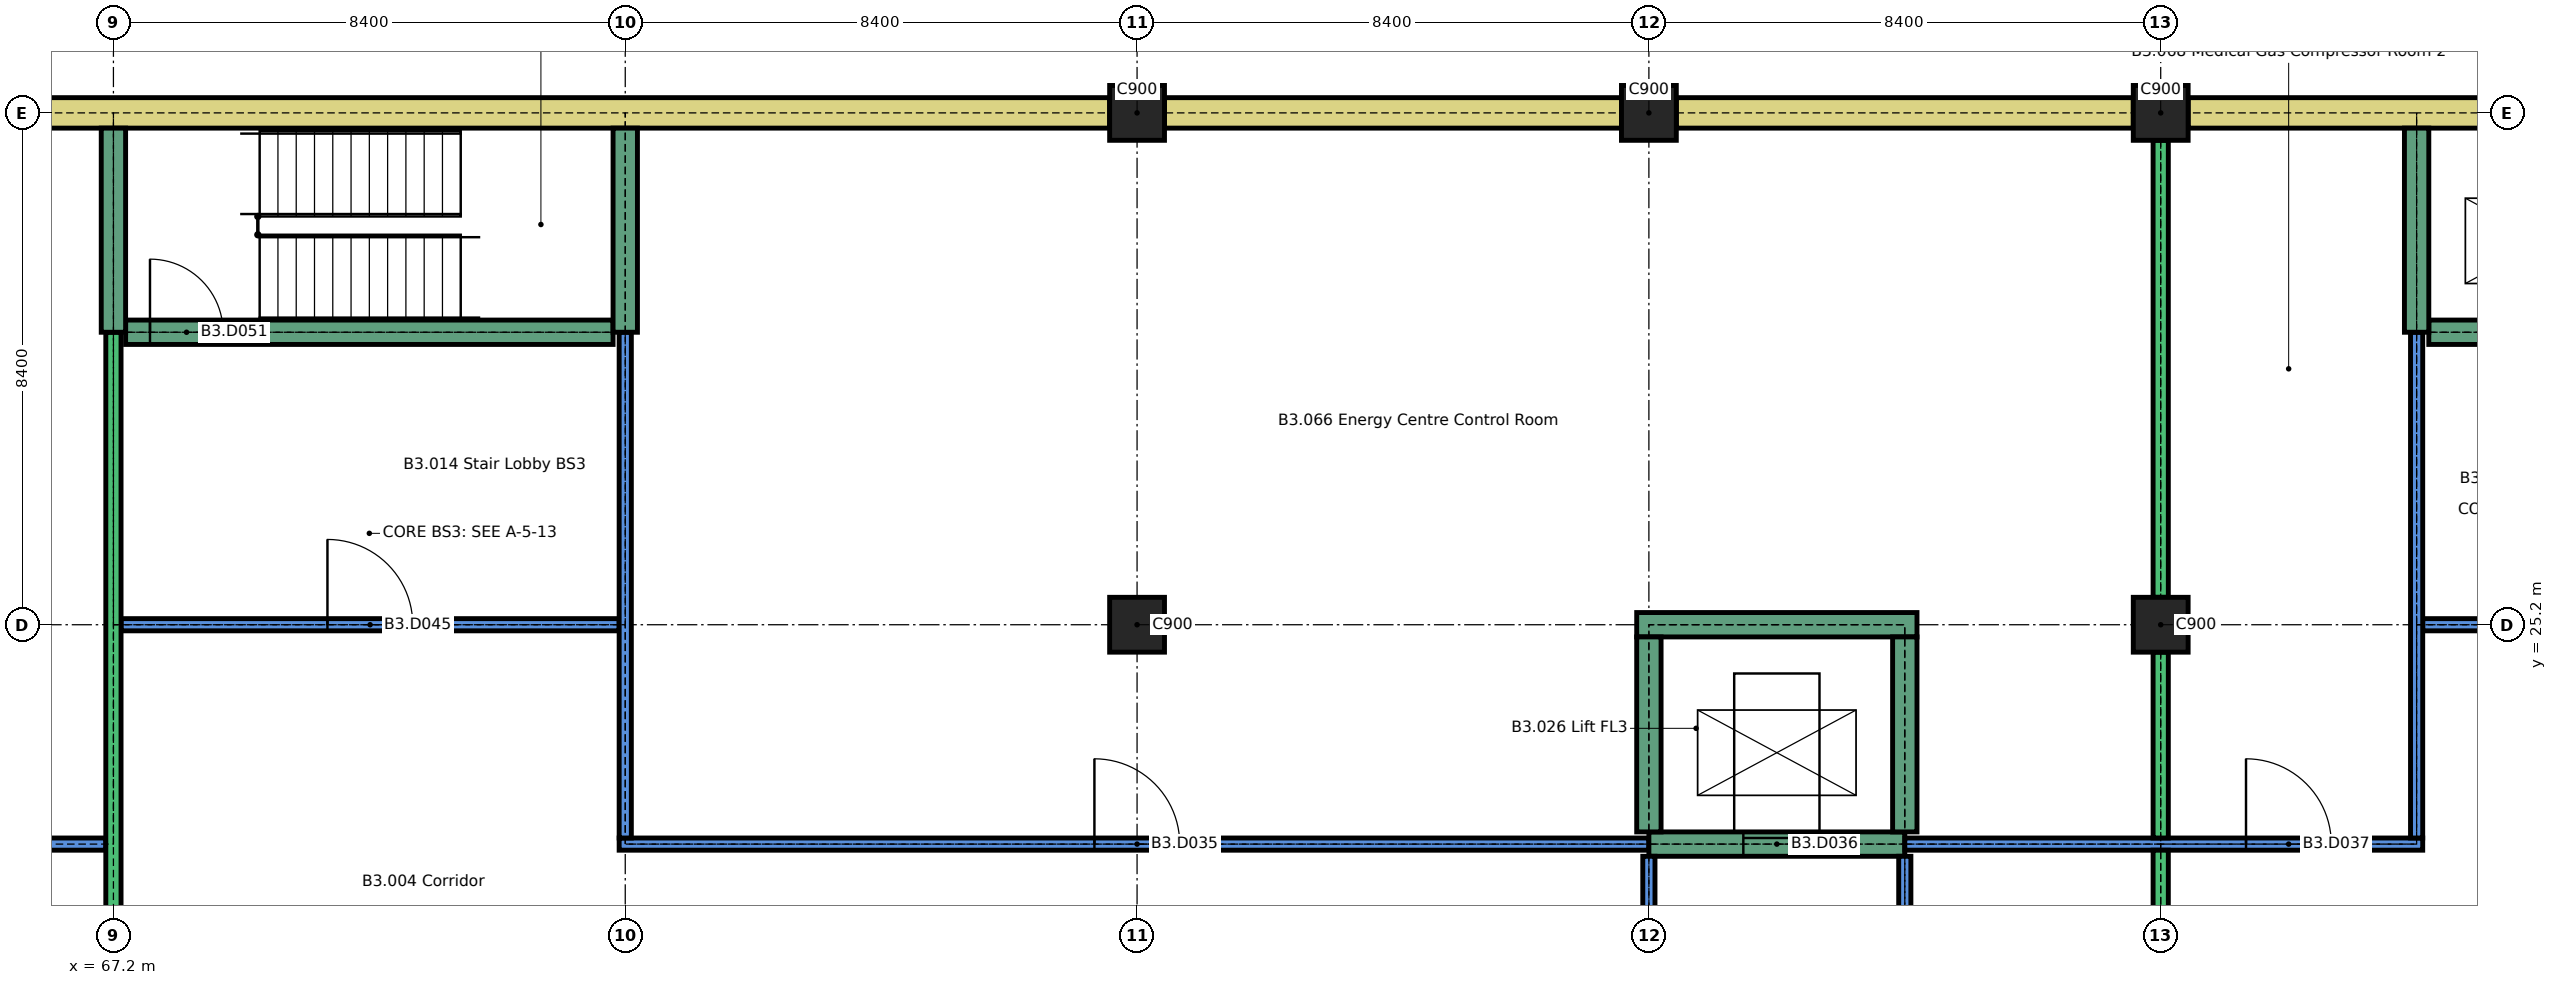
"""IFC4 building model, lengths in metres.
Left out: names, types, materials, properties, quantities, classifications, styles, units other than length and angle.
Written with IfcOpenShell. Run it as: python <this file> out.ifc"""

import sys

from ifc_helpers import new_model, si_unit, direction, frame, frame_2d, origin, origin_2d, place, context, subcontext, project, spatial, rectangle, extrude, element, fill, save


model = new_model("IFC4")
c1 = context("Model", 3, precision=1e-05, world=origin(), true_north=direction((0.0, 1.0)))
c2 = subcontext(c1, "Body", "Model", "MODEL_VIEW")
j1 = project(units=[si_unit("LENGTHUNIT", "METRE"), si_unit("PLANEANGLEUNIT", "RADIAN")], contexts=[c1])
p1 = place(None, origin())
s1 = spatial("IfcSite", under=j1, at=p1, CompositionType="ELEMENT")
p2 = place(p1, origin())
s2 = spatial("IfcBuilding", under=s1, at=p2, CompositionType="ELEMENT")
p3 = place(p2, frame((0.0, 0.0, -11.4)))
s3 = spatial("IfcBuildingStorey", under=s2, at=p3, CompositionType="ELEMENT", Elevation=-11.4)
for number, where, z_axis, x_axis in (
    (1, (84.0, 25.2, 0.0), (0.0, 0.0, 1.0), (1.0, 0.0, 0.0)),
    (2, (100.8, 25.2, 0.0), (0.0, 0.0, 1.0), (1.0, 0.0, 0.0)),
    (3, (84.0, 33.6, 0.0), (0.0, 0.0, 1.0), (1.0, 0.0, 0.0)),
    (4, (92.4, 33.6, 0.0), (0.0, 0.0, 1.0), (1.0, 0.0, 0.0)),
    (5, (100.8, 33.6, 0.0), (0.0, 0.0, 1.0), (1.0, 0.0, 0.0)),
):
    element("IfcColumn", number, at=place(p3, frame(where, z_axis=z_axis, x_axis=x_axis)), inside=s3, PredefinedType="COLUMN", context=c2, shape_type="SweptSolid", body=[
        extrude(rectangle(XDim=0.9, YDim=0.9, at=origin_2d()), origin(), (0.0, 0.0, 1.0), 3.2),
    ])
p4 = place(p3, frame((42.45, 33.6, 0.0), z_axis=(0.0, 0.0, 1.0), x_axis=(1.0, 0.0, 0.0)))
e6 = element("IfcWall", 6, at=p4, inside=s3, PredefinedType="SOLIDWALL", context=c2, shape_type="SweptSolid", body=[
    extrude(rectangle(XDim=41.1, YDim=0.5, at=frame_2d((20.55, 0.0))), origin(), (0.0, 0.0, 1.0), 3.2),
])
for number, where, z_axis, x_axis in (
    (7, (84.45, 33.6, 0.0), (0.0, 0.0, 1.0), (1.0, 0.0, 0.0)),
    (8, (92.85, 33.6, 0.0), (0.0, 0.0, 1.0), (1.0, 0.0, 0.0)),
):
    element("IfcWall", number, at=place(p3, frame(where, z_axis=z_axis, x_axis=x_axis)), inside=s3, PredefinedType="SOLIDWALL", context=c2, shape_type="SweptSolid", body=[
        extrude(rectangle(XDim=7.5, YDim=0.5, at=frame_2d((3.75, 0.0))), origin(), (0.0, 0.0, 1.0), 3.2),
    ])
p5 = place(p3, frame((101.25, 33.6, 0.0), z_axis=(0.0, 0.0, 1.0), x_axis=(1.0, 0.0, 0.0)))
e9 = element("IfcWall", 9, at=p5, inside=s3, PredefinedType="SOLIDWALL", context=c2, shape_type="SweptSolid", body=[
    extrude(rectangle(XDim=32.7, YDim=0.5, at=frame_2d((16.35, 0.0))), origin(), (0.0, 0.0, 1.0), 3.2),
])
p6 = place(p3, frame((58.7, 21.6, 0.0), z_axis=(0.0, 0.0, 1.0), x_axis=(1.0, 0.0, 0.0)))
e10 = element("IfcWall", 10, at=p6, inside=s3, PredefinedType="PARTITIONING", context=c2, shape_type="SweptSolid", body=[
    extrude(rectangle(XDim=8.375, YDim=0.2, at=frame_2d((4.188, 0.0))), origin(), (0.0, 0.0, 1.0), 3.2),
])
p7 = place(p6, frame((3.538, 0.0, 0.0)))
e11 = element("IfcOpeningElement", 11, at=p7, cuts=e10, PredefinedType="OPENING", context=c2, shape_type="SweptSolid", body=[
    extrude(rectangle(XDim=1.4, YDim=2.1, at=frame_2d((0.7, 1.05))), frame((0.0, 0.11, 0.0), z_axis=(0.0, -1.0, 0.0), x_axis=(1.0, 0.0, 0.0)), (0.0, 0.0, 1.0), 0.22),
])
p8 = place(p3, frame((75.5, 21.6, 0.0), z_axis=(0.0, 0.0, 1.0), x_axis=(1.0, 0.0, 0.0)))
e12 = element("IfcWall", 12, at=p8, inside=s3, PredefinedType="PARTITIONING", context=c2, shape_type="SweptSolid", body=[
    extrude(rectangle(XDim=16.9, YDim=0.2, at=frame_2d((8.45, 0.0))), origin(), (0.0, 0.0, 1.0), 3.2),
])
p9 = place(p8, frame((7.8, 0.0, 0.0)))
e13 = element("IfcOpeningElement", 13, at=p9, cuts=e12, PredefinedType="OPENING", context=c2, shape_type="SweptSolid", body=[
    extrude(rectangle(XDim=1.4, YDim=2.1, at=frame_2d((0.7, 1.05))), frame((0.0, 0.11, 0.0), z_axis=(0.0, -1.0, 0.0), x_axis=(1.0, 0.0, 0.0)), (0.0, 0.0, 1.0), 0.22),
])
p10 = place(p3, frame((92.4, 21.6, 0.0), z_axis=(0.0, 0.0, 1.0), x_axis=(1.0, 0.0, 0.0)))
e14 = element("IfcWall", 14, at=p10, inside=s3, PredefinedType="SHEAR", context=c2, shape_type="SweptSolid", body=[
    extrude(rectangle(XDim=4.2, YDim=0.4, at=frame_2d((2.1, 0.0))), origin(), (0.0, 0.0, 1.0), 3.2),
])
p11 = place(p10, frame((1.55, 0.0, 0.0)))
e15 = element("IfcOpeningElement", 15, at=p11, cuts=e14, PredefinedType="OPENING", context=c2, shape_type="SweptSolid", body=[
    extrude(rectangle(XDim=1.1, YDim=2.1, at=frame_2d((0.55, 1.05))), frame((0.0, 0.21, 0.0), z_axis=(0.0, -1.0, 0.0), x_axis=(1.0, 0.0, 0.0)), (0.0, 0.0, 1.0), 0.42),
])
p12 = place(p3, frame((96.6, 21.6, 0.0), z_axis=(0.0, 0.0, 1.0), x_axis=(1.0, 0.0, 0.0)))
e16 = element("IfcWall", 16, at=p12, inside=s3, PredefinedType="PARTITIONING", context=c2, shape_type="SweptSolid", body=[
    extrude(rectangle(XDim=8.5, YDim=0.2, at=frame_2d((4.25, 0.0))), origin(), (0.0, 0.0, 1.0), 3.2),
])
p13 = place(p12, frame((5.6, 0.0, 0.0)))
e17 = element("IfcOpeningElement", 17, at=p13, cuts=e16, PredefinedType="OPENING", context=c2, shape_type="SweptSolid", body=[
    extrude(rectangle(XDim=1.4, YDim=2.1, at=frame_2d((0.7, 1.05))), frame((0.0, 0.11, 0.0), z_axis=(0.0, -1.0, 0.0), x_axis=(1.0, 0.0, 0.0)), (0.0, 0.0, 1.0), 0.22),
])
p14 = place(p3, frame((67.325, 25.2, 0.0), z_axis=(0.0, 0.0, 1.0), x_axis=(1.0, 0.0, 0.0)))
e18 = element("IfcWall", 18, at=p14, inside=s3, PredefinedType="PARTITIONING", context=c2, shape_type="SweptSolid", body=[
    extrude(rectangle(XDim=8.175, YDim=0.2, at=frame_2d((4.087, 0.0))), origin(), (0.0, 0.0, 1.0), 3.2),
])
p15 = place(p14, frame((3.387, 0.0, 0.0)))
e19 = element("IfcOpeningElement", 19, at=p15, cuts=e18, PredefinedType="OPENING", context=c2, shape_type="SweptSolid", body=[
    extrude(rectangle(XDim=1.4, YDim=2.1, at=frame_2d((0.7, 1.05))), frame((0.0, 0.11, 0.0), z_axis=(0.0, -1.0, 0.0), x_axis=(1.0, 0.0, 0.0)), (0.0, 0.0, 1.0), 0.22),
])
p16 = place(p3, frame((92.2, 25.2, 0.0), z_axis=(0.0, 0.0, 1.0), x_axis=(1.0, 0.0, 0.0)))
e20 = element("IfcWall", 20, at=p16, inside=s3, PredefinedType="SHEAR", context=c2, shape_type="SweptSolid", body=[
    extrude(rectangle(XDim=4.6, YDim=0.4, at=frame_2d((2.3, 0.0))), origin(), (0.0, 0.0, 1.0), 3.2),
])
p17 = place(p3, frame((105.1, 25.2, 0.0), z_axis=(0.0, 0.0, 1.0), x_axis=(1.0, 0.0, 0.0)))
e21 = element("IfcWall", 21, at=p17, inside=s3, PredefinedType="PARTITIONING", context=c2, shape_type="SweptSolid", body=[
    extrude(rectangle(XDim=4.0, YDim=0.2, at=frame_2d((2.0, 0.0))), origin(), (0.0, 0.0, 1.0), 3.2),
])
p18 = place(p17, frame((1.0, 0.0, 0.0)))
e22 = element("IfcOpeningElement", 22, at=p18, cuts=e21, PredefinedType="OPENING", context=c2, shape_type="SweptSolid", body=[
    extrude(rectangle(XDim=2.0, YDim=2.4, at=frame_2d((1.0, 1.2))), frame((0.0, 0.11, 0.0), z_axis=(0.0, -1.0, 0.0), x_axis=(1.0, 0.0, 0.0)), (0.0, 0.0, 1.0), 0.22),
])
p19 = place(p3, frame((67.4, 30.0, 0.0), z_axis=(0.0, 0.0, 1.0), x_axis=(1.0, 0.0, 0.0)))
e23 = element("IfcWall", 23, at=p19, inside=s3, PredefinedType="SHEAR", context=c2, shape_type="SweptSolid", body=[
    extrude(rectangle(XDim=8.0, YDim=0.4, at=frame_2d((4.0, 0.0))), origin(), (0.0, 0.0, 1.0), 3.2),
])
p20 = place(p19, frame((0.4, 0.0, 0.0)))
e24 = element("IfcOpeningElement", 24, at=p20, cuts=e23, PredefinedType="OPENING", context=c2, shape_type="SweptSolid", body=[
    extrude(rectangle(XDim=1.2, YDim=2.1, at=frame_2d((0.6, 1.05))), frame((0.0, 0.21, 0.0), z_axis=(0.0, -1.0, 0.0), x_axis=(1.0, 0.0, 0.0)), (0.0, 0.0, 1.0), 0.42),
])
p21 = place(p3, frame((105.2, 30.0, 0.0), z_axis=(0.0, 0.0, 1.0), x_axis=(1.0, 0.0, 0.0)))
e25 = element("IfcWall", 25, at=p21, inside=s3, PredefinedType="SHEAR", context=c2, shape_type="SweptSolid", body=[
    extrude(rectangle(XDim=3.8, YDim=0.4, at=frame_2d((1.9, 0.0))), origin(), (0.0, 0.0, 1.0), 3.2),
])
p22 = place(p21, frame((1.35, 0.0, 0.0)))
e26 = element("IfcOpeningElement", 26, at=p22, cuts=e25, PredefinedType="OPENING", context=c2, shape_type="SweptSolid", body=[
    extrude(rectangle(XDim=1.1, YDim=2.1, at=frame_2d((0.55, 1.05))), frame((0.0, 0.21, 0.0), z_axis=(0.0, -1.0, 0.0), x_axis=(1.0, 0.0, 0.0)), (0.0, 0.0, 1.0), 0.42),
])
p23 = place(p3, frame((67.2, 17.25, 0.0), z_axis=(0.0, 0.0, 1.0), x_axis=(0.0, 1.0, 0.0)))
e27 = element("IfcWall", 27, at=p23, inside=s3, PredefinedType="SOLIDWALL", context=c2, shape_type="SweptSolid", body=[
    extrude(rectangle(XDim=12.75, YDim=0.25, at=frame_2d((6.375, 0.0))), origin(), (0.0, 0.0, 1.0), 3.2),
])
p24 = place(p23, frame((1.475, 0.0, 0.0)))
e28 = element("IfcOpeningElement", 28, at=p24, cuts=e27, PredefinedType="OPENING", context=c2, shape_type="SweptSolid", body=[
    extrude(rectangle(XDim=1.4, YDim=2.1, at=frame_2d((0.7, 1.05))), frame((0.0, 0.135, 0.0), z_axis=(0.0, -1.0, 0.0), x_axis=(1.0, 0.0, 0.0)), (0.0, 0.0, 1.0), 0.27),
])
p25 = place(p3, frame((67.2, 30.0, 0.0), z_axis=(0.0, 0.0, 1.0), x_axis=(0.0, 1.0, 0.0)))
e29 = element("IfcWall", 29, at=p25, inside=s3, PredefinedType="SHEAR", context=c2, shape_type="SweptSolid", body=[
    extrude(rectangle(XDim=3.35, YDim=0.4, at=frame_2d((1.675, 0.0))), origin(), (0.0, 0.0, 1.0), 3.2),
])
p26 = place(p3, frame((75.6, 21.7, 0.0), z_axis=(0.0, 0.0, 1.0), x_axis=(0.0, 1.0, 0.0)))
e30 = element("IfcWall", 30, at=p26, inside=s3, PredefinedType="PARTITIONING", context=c2, shape_type="SweptSolid", body=[
    extrude(rectangle(XDim=8.3, YDim=0.2, at=frame_2d((4.15, 0.0))), origin(), (0.0, 0.0, 1.0), 3.2),
])
p27 = place(p3, frame((75.6, 30.0, 0.0), z_axis=(0.0, 0.0, 1.0), x_axis=(0.0, 1.0, 0.0)))
e31 = element("IfcWall", 31, at=p27, inside=s3, PredefinedType="SHEAR", context=c2, shape_type="SweptSolid", body=[
    extrude(rectangle(XDim=3.35, YDim=0.4, at=frame_2d((1.675, 0.0))), origin(), (0.0, 0.0, 1.0), 3.2),
])
p28 = place(p3, frame((92.4, 16.9, 0.0), z_axis=(0.0, 0.0, 1.0), x_axis=(0.0, 1.0, 0.0)))
e32 = element("IfcWall", 32, at=p28, inside=s3, PredefinedType="PARTITIONING", context=c2, shape_type="SweptSolid", body=[
    extrude(rectangle(XDim=4.5, YDim=0.2, at=frame_2d((2.25, 0.0))), origin(), (0.0, 0.0, 1.0), 3.2),
])
p29 = place(p28, frame((1.25, 0.0, 0.0)))
e33 = element("IfcOpeningElement", 33, at=p29, cuts=e32, PredefinedType="OPENING", context=c2, shape_type="SweptSolid", body=[
    extrude(rectangle(XDim=2.0, YDim=2.4, at=frame_2d((1.0, 1.2))), frame((0.0, 0.11, 0.0), z_axis=(0.0, -1.0, 0.0), x_axis=(1.0, 0.0, 0.0)), (0.0, 0.0, 1.0), 0.22),
])
p30 = place(p3, frame((92.4, 21.8, 0.0), z_axis=(0.0, 0.0, 1.0), x_axis=(0.0, 1.0, 0.0)))
e34 = element("IfcWall", 34, at=p30, inside=s3, PredefinedType="SHEAR", context=c2, shape_type="SweptSolid", body=[
    extrude(rectangle(XDim=3.2, YDim=0.4, at=frame_2d((1.6, 0.0))), origin(), (0.0, 0.0, 1.0), 3.2),
])
p31 = place(p3, frame((96.6, 16.9, 0.0), z_axis=(0.0, 0.0, 1.0), x_axis=(0.0, 1.0, 0.0)))
e35 = element("IfcWall", 35, at=p31, inside=s3, PredefinedType="PARTITIONING", context=c2, shape_type="SweptSolid", body=[
    extrude(rectangle(XDim=4.5, YDim=0.2, at=frame_2d((2.25, 0.0))), origin(), (0.0, 0.0, 1.0), 3.2),
])
p32 = place(p31, frame((1.25, 0.0, 0.0)))
e36 = element("IfcOpeningElement", 36, at=p32, cuts=e35, PredefinedType="OPENING", context=c2, shape_type="SweptSolid", body=[
    extrude(rectangle(XDim=2.0, YDim=2.4, at=frame_2d((1.0, 1.2))), frame((0.0, 0.11, 0.0), z_axis=(0.0, -1.0, 0.0), x_axis=(1.0, 0.0, 0.0)), (0.0, 0.0, 1.0), 0.22),
])
p33 = place(p3, frame((96.6, 21.8, 0.0), z_axis=(0.0, 0.0, 1.0), x_axis=(0.0, 1.0, 0.0)))
e37 = element("IfcWall", 37, at=p33, inside=s3, PredefinedType="SHEAR", context=c2, shape_type="SweptSolid", body=[
    extrude(rectangle(XDim=3.2, YDim=0.4, at=frame_2d((1.6, 0.0))), origin(), (0.0, 0.0, 1.0), 3.2),
])
p34 = place(p3, frame((100.8, 17.25, 0.0), z_axis=(0.0, 0.0, 1.0), x_axis=(0.0, 1.0, 0.0)))
e38 = element("IfcWall", 38, at=p34, inside=s3, PredefinedType="SOLIDWALL", context=c2, shape_type="SweptSolid", body=[
    extrude(rectangle(XDim=4.25, YDim=0.25, at=frame_2d((2.125, 0.0))), origin(), (0.0, 0.0, 1.0), 3.2),
])
p35 = place(p34, frame((1.425, 0.0, 0.0)))
e39 = element("IfcOpeningElement", 39, at=p35, cuts=e38, PredefinedType="OPENING", context=c2, shape_type="SweptSolid", body=[
    extrude(rectangle(XDim=1.4, YDim=2.1, at=frame_2d((0.7, 1.05))), frame((0.0, 0.135, 0.0), z_axis=(0.0, -1.0, 0.0), x_axis=(1.0, 0.0, 0.0)), (0.0, 0.0, 1.0), 0.27),
])
p36 = place(p3, frame((100.8, 21.7, 0.0), z_axis=(0.0, 0.0, 1.0), x_axis=(0.0, 1.0, 0.0)))
e40 = element("IfcWall", 40, at=p36, inside=s3, PredefinedType="SOLIDWALL", context=c2, shape_type="SweptSolid", body=[
    extrude(rectangle(XDim=3.05, YDim=0.25, at=frame_2d((1.525, 0.0))), origin(), (0.0, 0.0, 1.0), 3.2),
])
p37 = place(p3, frame((100.8, 25.65, 0.0), z_axis=(0.0, 0.0, 1.0), x_axis=(0.0, 1.0, 0.0)))
e41 = element("IfcWall", 41, at=p37, inside=s3, PredefinedType="SOLIDWALL", context=c2, shape_type="SweptSolid", body=[
    extrude(rectangle(XDim=7.5, YDim=0.25, at=frame_2d((3.75, 0.0))), origin(), (0.0, 0.0, 1.0), 3.2),
])
p38 = place(p3, frame((105.0, 21.7, 0.0), z_axis=(0.0, 0.0, 1.0), x_axis=(0.0, 1.0, 0.0)))
e42 = element("IfcWall", 42, at=p38, inside=s3, PredefinedType="PARTITIONING", context=c2, shape_type="SweptSolid", body=[
    extrude(rectangle(XDim=8.3, YDim=0.2, at=frame_2d((4.15, 0.0))), origin(), (0.0, 0.0, 1.0), 3.2),
])
p39 = place(p3, frame((105.0, 30.0, 0.0), z_axis=(0.0, 0.0, 1.0), x_axis=(0.0, 1.0, 0.0)))
e43 = element("IfcWall", 43, at=p39, inside=s3, PredefinedType="SHEAR", context=c2, shape_type="SweptSolid", body=[
    extrude(rectangle(XDim=3.35, YDim=0.4, at=frame_2d((1.675, 0.0))), origin(), (0.0, 0.0, 1.0), 3.2),
])
p40 = place(p9, origin())
e44 = element("IfcDoor", 44, at=p40, inside=s3, OperationType="SINGLE_SWING_RIGHT", PredefinedType="DOOR", context=c2, shape_type="SweptSolid", body=[
    extrude(rectangle(XDim=1.4, YDim=2.1, at=frame_2d((0.7, 1.05))), frame((0.0, 0.025, 0.0), z_axis=(0.0, -1.0, 0.0), x_axis=(1.0, 0.0, 0.0)), (0.0, 0.0, 1.0), 0.05),
])
fill(e13, e44)
p41 = place(p11, origin())
e45 = element("IfcDoor", 45, at=p41, inside=s3, OperationType="SLIDING_TO_LEFT", PredefinedType="DOOR", context=c2, shape_type="SweptSolid", body=[
    extrude(rectangle(XDim=1.1, YDim=2.1, at=frame_2d((0.55, 1.05))), frame((0.0, 0.025, 0.0), z_axis=(0.0, -1.0, 0.0), x_axis=(1.0, 0.0, 0.0)), (0.0, 0.0, 1.0), 0.05),
])
fill(e15, e45)
p42 = place(p13, origin())
e46 = element("IfcDoor", 46, at=p42, inside=s3, OperationType="SINGLE_SWING_RIGHT", PredefinedType="DOOR", context=c2, shape_type="SweptSolid", body=[
    extrude(rectangle(XDim=1.4, YDim=2.1, at=frame_2d((0.7, 1.05))), frame((0.0, 0.025, 0.0), z_axis=(0.0, -1.0, 0.0), x_axis=(1.0, 0.0, 0.0)), (0.0, 0.0, 1.0), 0.05),
])
fill(e17, e46)
p43 = place(p15, origin())
e47 = element("IfcDoor", 47, at=p43, inside=s3, OperationType="SINGLE_SWING_RIGHT", PredefinedType="DOOR", context=c2, shape_type="SweptSolid", body=[
    extrude(rectangle(XDim=1.4, YDim=2.1, at=frame_2d((0.7, 1.05))), frame((0.0, 0.03, 0.0), z_axis=(0.0, -1.0, 0.0), x_axis=(1.0, 0.0, 0.0)), (0.0, 0.0, 1.0), 0.06),
])
fill(e19, e47)
p44 = place(p20, origin())
e48 = element("IfcDoor", 48, at=p44, inside=s3, OperationType="SINGLE_SWING_RIGHT", PredefinedType="DOOR", context=c2, shape_type="SweptSolid", body=[
    extrude(rectangle(XDim=1.2, YDim=2.1, at=frame_2d((0.6, 1.05))), frame((0.0, 0.025, 0.0), z_axis=(0.0, -1.0, 0.0), x_axis=(1.0, 0.0, 0.0)), (0.0, 0.0, 1.0), 0.05),
])
fill(e24, e48)
save(model, sys.argv[1])
